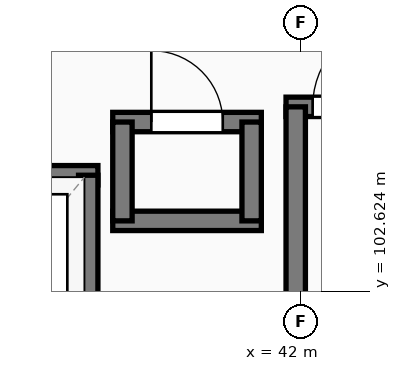
"""IFC4 building model, lengths in metres.
Left out: names, types, materials, properties, quantities, classifications, styles, units other than length and angle.
Written with IfcOpenShell. Run it as: python <this file> out.ifc"""

import sys

from ifc_helpers import new_model, si_unit, direction, frame, frame_2d, origin, place, context, subcontext, project, spatial, rectangle, extrude, element, fill, save


model = new_model("IFC4")
c1 = context("Model", 3, precision=1e-05, world=origin(), true_north=direction((0.0, 1.0)))
c2 = subcontext(c1, "Body", "Model", "MODEL_VIEW")
j1 = project(units=[si_unit("LENGTHUNIT", "METRE"), si_unit("PLANEANGLEUNIT", "RADIAN")], contexts=[c1])
p1 = place(None, origin())
s1 = spatial("IfcSite", under=j1, at=p1, CompositionType="ELEMENT")
p2 = place(p1, origin())
s2 = spatial("IfcBuilding", under=s1, at=p2, CompositionType="ELEMENT")
p3 = place(p2, frame((0.0, 0.0, -7.56)))
s3 = spatial("IfcBuildingStorey", under=s2, at=p3, CompositionType="ELEMENT", Elevation=-7.56)
p4 = place(p3, frame((41.802, 105.05, -0.5), z_axis=(0.0, 0.0, 1.0), x_axis=(1.0, 0.0, 0.0)))
e1 = element("IfcWall", 1, at=p4, inside=s3, PredefinedType="SOLIDWALL", context=c2, shape_type="SweptSolid", body=[
    extrude(rectangle(XDim=8.225, YDim=0.255, at=frame_2d((4.113, 0.0))), origin(), (0.0, 0.0, 1.0), 3.46),
])
p5 = place(p4, frame((0.35, 0.0, 0.5)))
e2 = element("IfcOpeningElement", 2, at=p5, cuts=e1, PredefinedType="OPENING", context=c2, shape_type="SweptSolid", body=[
    extrude(rectangle(XDim=1.16, YDim=2.15, at=frame_2d((0.58, 1.075))), frame((0.0, 0.137, 0.0), z_axis=(0.0, -1.0, 0.0), x_axis=(1.0, 0.0, 0.0)), (0.0, 0.0, 1.0), 0.275),
])
p6 = place(p3, frame((41.93, 101.42, -0.5), z_axis=(0.0, 0.0, 1.0), x_axis=(0.0, 1.0, 0.0)))
e3 = element("IfcWall", 3, at=p6, inside=s3, PredefinedType="SOLIDWALL", context=c2, shape_type="SweptSolid", body=[
    extrude(rectangle(XDim=3.63, YDim=0.255, at=frame_2d((1.815, 0.0))), origin(), (0.0, 0.0, 1.0), 3.46),
])
p7 = place(p3, frame((36.873, 104.15, -0.5), z_axis=(0.0, 0.0, 1.0), x_axis=(1.0, 0.0, 0.0)))
e4 = element("IfcWall", 4, at=p7, inside=s3, PredefinedType="SOLIDWALL", context=c2, shape_type="SweptSolid", body=[
    extrude(rectangle(XDim=2.455, YDim=0.255, at=frame_2d((1.228, 0.0))), origin(), (0.0, 0.0, 1.0), 3.46),
])
p8 = place(p7, frame((0.677, 0.0, 0.5)))
e5 = element("IfcOpeningElement", 5, at=p8, cuts=e4, PredefinedType="OPENING", context=c2, shape_type="SweptSolid", body=[
    extrude(rectangle(XDim=1.1, YDim=2.15, at=frame_2d((0.55, 1.075))), frame((0.0, 0.137, 0.0), z_axis=(0.0, -1.0, 0.0), x_axis=(1.0, 0.0, 0.0)), (0.0, 0.0, 1.0), 0.275),
])
p9 = place(p3, frame((39.2, 101.55, -0.5), z_axis=(0.0, 0.0, 1.0), x_axis=(0.0, 1.0, 0.0)))
e6 = element("IfcWall", 6, at=p9, inside=s3, PredefinedType="SOLIDWALL", context=c2, shape_type="SweptSolid", body=[
    extrude(rectangle(XDim=2.6, YDim=0.255, at=frame_2d((1.3, 0.0))), origin(), (0.0, 0.0, 1.0), 3.46),
])
p10 = place(p3, frame((39.522, 103.55, -0.5), z_axis=(0.0, 0.0, 1.0), x_axis=(1.0, 0.0, 0.0)))
e7 = element("IfcWall", 7, at=p10, inside=s3, PredefinedType="SOLIDWALL", context=c2, shape_type="SweptSolid", body=[
    extrude(rectangle(XDim=1.955, YDim=0.255, at=frame_2d((0.978, 0.0))), origin(), (0.0, 0.0, 1.0), 3.46),
])
p11 = place(p3, frame((39.522, 104.85, -0.5), z_axis=(0.0, 0.0, 1.0), x_axis=(1.0, 0.0, 0.0)))
e8 = element("IfcWall", 8, at=p11, inside=s3, PredefinedType="SOLIDWALL", context=c2, shape_type="SweptSolid", body=[
    extrude(rectangle(XDim=1.955, YDim=0.255, at=frame_2d((0.978, 0.0))), origin(), (0.0, 0.0, 1.0), 3.46),
])
p12 = place(p11, frame((0.508, 0.0, 0.5)))
e9 = element("IfcOpeningElement", 9, at=p12, cuts=e8, PredefinedType="OPENING", context=c2, shape_type="SweptSolid", body=[
    extrude(rectangle(XDim=0.94, YDim=2.1, at=frame_2d((0.47, 1.05))), frame((0.0, 0.137, 0.0), z_axis=(0.0, -1.0, 0.0), x_axis=(1.0, 0.0, 0.0)), (0.0, 0.0, 1.0), 0.275),
])
for number, where, z_axis, x_axis in (
    (10, (39.65, 103.55, -0.5), (0.0, 0.0, 1.0), (0.0, 1.0, 0.0)),
    (11, (41.35, 103.55, -0.5), (0.0, 0.0, 1.0), (0.0, 1.0, 0.0)),
):
    element("IfcWall", number, at=place(p3, frame(where, z_axis=z_axis, x_axis=x_axis)), inside=s3, PredefinedType="SOLIDWALL", context=c2, shape_type="SweptSolid", body=[
        extrude(rectangle(XDim=1.3, YDim=0.255, at=frame_2d((0.65, 0.0))), origin(), (0.0, 0.0, 1.0), 3.46),
    ])
p13 = place(p5, origin())
e12 = element("IfcDoor", 12, at=p13, inside=s3, OperationType="SINGLE_SWING_RIGHT", PredefinedType="DOOR", context=c2, shape_type="SweptSolid", body=[
    extrude(rectangle(XDim=1.16, YDim=2.15, at=frame_2d((0.58, 1.075))), frame((0.0, 0.025, 0.0), z_axis=(0.0, -1.0, 0.0), x_axis=(1.0, 0.0, 0.0)), (0.0, 0.0, 1.0), 0.05),
])
fill(e2, e12)
p14 = place(p12, origin())
e13 = element("IfcDoor", 13, at=p14, inside=s3, OperationType="SINGLE_SWING_LEFT", PredefinedType="DOOR", context=c2, shape_type="SweptSolid", body=[
    extrude(rectangle(XDim=0.94, YDim=2.1, at=frame_2d((0.47, 1.05))), frame((0.0, 0.025, 0.0), z_axis=(0.0, -1.0, 0.0), x_axis=(1.0, 0.0, 0.0)), (0.0, 0.0, 1.0), 0.05),
])
fill(e9, e13)
save(model, sys.argv[1])
